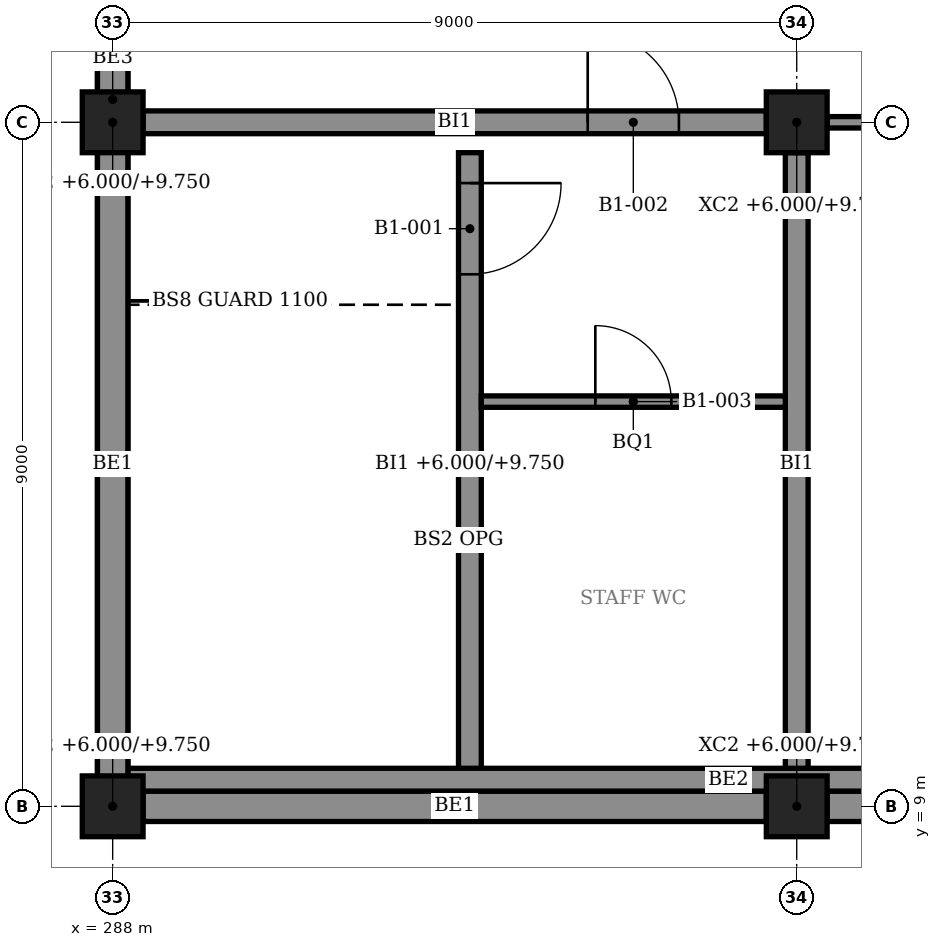
"""IFC4 building model, lengths in metres.
Left out: names, types, materials, properties, quantities, classifications, styles, units other than length and angle.
Written with IfcOpenShell. Run it as: python <this file> out.ifc"""

import sys

from ifc_helpers import new_model, si_unit, direction, frame, frame_2d, origin, origin_2d, place, context, subcontext, project, spatial, rectangle, extrude, element, fill, save


model = new_model("IFC4")
c1 = context("Model", 3, precision=1e-05, world=origin(), true_north=direction((0.0, 1.0)))
c2 = subcontext(c1, "Body", "Model", "MODEL_VIEW")
j1 = project(units=[si_unit("LENGTHUNIT", "METRE"), si_unit("PLANEANGLEUNIT", "RADIAN")], contexts=[c1])
p1 = place(None, origin())
s1 = spatial("IfcSite", under=j1, at=p1, CompositionType="ELEMENT")
p2 = place(p1, origin())
s2 = spatial("IfcBuilding", under=s1, at=p2, CompositionType="ELEMENT")
p3 = place(p2, frame((0.0, 0.0, 6.0)))
s3 = spatial("IfcBuildingStorey", under=s2, at=p3, CompositionType="ELEMENT", Elevation=6.0)
for number, where, z_axis, x_axis in (
    (1, (288.0, 9.0, 0.0), (0.0, 0.0, 1.0), (1.0, 0.0, 0.0)),
    (2, (297.0, 9.0, 0.0), (0.0, 0.0, 1.0), (1.0, 0.0, 0.0)),
    (3, (288.0, 18.0, 0.0), (0.0, 0.0, 1.0), (1.0, 0.0, 0.0)),
    (4, (297.0, 18.0, 0.0), (0.0, 0.0, 1.0), (1.0, 0.0, 0.0)),
):
    element("IfcColumn", number, at=place(p3, frame(where, z_axis=z_axis, x_axis=x_axis)), inside=s3, PredefinedType="COLUMN", context=c2, shape_type="SweptSolid", body=[
        extrude(rectangle(XDim=0.8, YDim=0.8, at=origin_2d()), origin(), (0.0, 0.0, 1.0), 3.75),
    ])
p4 = place(p3, frame((288.0, 9.4, 0.0), z_axis=(0.0, 0.0, 1.0), x_axis=(0.0, 1.0, 0.0)))
e5 = element("IfcWall", 5, at=p4, inside=s3, PredefinedType="STANDARD", context=c2, shape_type="SweptSolid", body=[
    extrude(rectangle(XDim=8.2, YDim=0.4, at=frame_2d((4.1, 0.0))), origin(), (0.0, 0.0, 1.0), 3.05),
])
p5 = place(p3, frame((288.0, 18.4, 0.0), z_axis=(0.0, 0.0, 1.0), x_axis=(0.0, 1.0, 0.0)))
e6 = element("IfcWall", 6, at=p5, inside=s3, PredefinedType="STANDARD", context=c2, shape_type="SweptSolid", body=[
    extrude(rectangle(XDim=8.2, YDim=0.4, at=frame_2d((4.1, 0.0))), origin(), (0.0, 0.0, 1.0), 3.05),
])
p6 = place(p5, frame((1.05, 0.0, 0.9)))
e7 = element("IfcOpeningElement", 7, at=p6, cuts=e6, PredefinedType="OPENING", context=c2, shape_type="SweptSolid", body=[
    extrude(rectangle(XDim=1.5, YDim=1.8, at=frame_2d((0.75, 0.9))), frame((0.0, 0.21, 0.0), z_axis=(0.0, -1.0, 0.0), x_axis=(1.0, 0.0, 0.0)), (0.0, 0.0, 1.0), 0.42),
])
p7 = place(p5, frame((3.55, 0.0, 0.9)))
e8 = element("IfcOpeningElement", 8, at=p7, cuts=e6, PredefinedType="OPENING", context=c2, shape_type="SweptSolid", body=[
    extrude(rectangle(XDim=1.5, YDim=1.8, at=frame_2d((0.75, 0.9))), frame((0.0, 0.21, 0.0), z_axis=(0.0, -1.0, 0.0), x_axis=(1.0, 0.0, 0.0)), (0.0, 0.0, 1.0), 0.42),
])
p8 = place(p5, frame((6.05, 0.0, 0.9)))
e9 = element("IfcOpeningElement", 9, at=p8, cuts=e6, PredefinedType="OPENING", context=c2, shape_type="SweptSolid", body=[
    extrude(rectangle(XDim=1.5, YDim=1.8, at=frame_2d((0.75, 0.9))), frame((0.0, 0.21, 0.0), z_axis=(0.0, -1.0, 0.0), x_axis=(1.0, 0.0, 0.0)), (0.0, 0.0, 1.0), 0.42),
])
for number, where, z_axis, x_axis in (
    (10, (288.4, 9.0, 0.0), (0.0, 0.0, 1.0), (1.0, 0.0, 0.0)),
    (11, (297.4, 9.0, 0.0), (0.0, 0.0, 1.0), (1.0, 0.0, 0.0)),
):
    element("IfcWall", number, at=place(p3, frame(where, z_axis=z_axis, x_axis=x_axis)), inside=s3, PredefinedType="STANDARD", context=c2, shape_type="SweptSolid", body=[
        extrude(rectangle(XDim=8.2, YDim=0.4, at=frame_2d((4.1, 0.0))), origin(), (0.0, 0.0, 1.0), 3.05),
    ])
p9 = place(p3, frame((288.0, 9.2, 4.0), z_axis=(0.0, 0.0, 1.0), x_axis=(0.0, 1.0, 0.0)))
e12 = element("IfcWall", 12, at=p9, inside=s3, PredefinedType="PARAPET", context=c2, shape_type="SweptSolid", body=[
    extrude(rectangle(XDim=18.2, YDim=0.4, at=frame_2d((9.1, 0.0))), origin(), (0.0, 0.0, 1.0), 1.121),
])
p10 = place(p3, frame((288.2, 9.35, 4.0), z_axis=(0.0, 0.0, 1.0), x_axis=(1.0, 0.0, 0.0)))
e13 = element("IfcWall", 13, at=p10, inside=s3, PredefinedType="PARAPET", context=c2, shape_type="SweptSolid", body=[
    extrude(rectangle(XDim=62.6, YDim=0.3, at=frame_2d((31.3, 0.0))), origin(), (0.0, 0.0, 1.0), 1.121),
])
p11 = place(p3, frame((292.7, 9.4, 0.0), z_axis=(0.0, 0.0, 1.0), x_axis=(0.0, 1.0, 0.0)))
e14 = element("IfcWall", 14, at=p11, inside=s3, PredefinedType="STANDARD", context=c2, shape_type="SweptSolid", body=[
    extrude(rectangle(XDim=8.2, YDim=0.3, at=frame_2d((4.1, 0.0))), origin(), (0.0, 0.0, 1.0), 3.75),
])
p12 = place(p11, frame((6.6, 0.0, 0.0)))
e15 = element("IfcOpeningElement", 15, at=p12, cuts=e14, PredefinedType="OPENING", context=c2, shape_type="SweptSolid", body=[
    extrude(rectangle(XDim=1.2, YDim=2.4, at=frame_2d((0.6, 1.2))), frame((0.0, 0.16, 0.0), z_axis=(0.0, -1.0, 0.0), x_axis=(1.0, 0.0, 0.0)), (0.0, 0.0, 1.0), 0.32),
])
p13 = place(p3, frame((297.0, 9.4, 0.0), z_axis=(0.0, 0.0, 1.0), x_axis=(0.0, 1.0, 0.0)))
e16 = element("IfcWall", 16, at=p13, inside=s3, PredefinedType="STANDARD", context=c2, shape_type="SweptSolid", body=[
    extrude(rectangle(XDim=8.2, YDim=0.3, at=frame_2d((4.1, 0.0))), origin(), (0.0, 0.0, 1.0), 3.05),
])
p14 = place(p3, frame((288.4, 18.0, 0.0), z_axis=(0.0, 0.0, 1.0), x_axis=(1.0, 0.0, 0.0)))
e17 = element("IfcWall", 17, at=p14, inside=s3, PredefinedType="STANDARD", context=c2, shape_type="SweptSolid", body=[
    extrude(rectangle(XDim=8.2, YDim=0.3, at=frame_2d((4.1, 0.0))), origin(), (0.0, 0.0, 1.0), 3.05),
])
p15 = place(p14, frame((5.85, 0.0, 0.0)))
e18 = element("IfcOpeningElement", 18, at=p15, cuts=e17, PredefinedType="OPENING", context=c2, shape_type="SweptSolid", body=[
    extrude(rectangle(XDim=1.2, YDim=2.4, at=frame_2d((0.6, 1.2))), frame((0.0, 0.16, 0.0), z_axis=(0.0, -1.0, 0.0), x_axis=(1.0, 0.0, 0.0)), (0.0, 0.0, 1.0), 0.32),
])
p16 = place(p3, frame((292.85, 14.325, 0.0), z_axis=(0.0, 0.0, 1.0), x_axis=(1.0, 0.0, 0.0)))
e19 = element("IfcWall", 19, at=p16, inside=s3, PredefinedType="PARTITIONING", context=c2, shape_type="SweptSolid", body=[
    extrude(rectangle(XDim=4.0, YDim=0.15, at=frame_2d((2.0, 0.0))), origin(), (0.0, 0.0, 1.0), 3.75),
])
p17 = place(p16, frame((1.5, 0.0, 0.0)))
e20 = element("IfcOpeningElement", 20, at=p17, cuts=e19, PredefinedType="OPENING", context=c2, shape_type="SweptSolid", body=[
    extrude(rectangle(XDim=1.0, YDim=2.4, at=frame_2d((0.5, 1.2))), frame((0.0, 0.085, 0.0), z_axis=(0.0, -1.0, 0.0), x_axis=(1.0, 0.0, 0.0)), (0.0, 0.0, 1.0), 0.17),
])
p18 = place(p3, frame((297.4, 18.0, 0.0), z_axis=(0.0, 0.0, 1.0), x_axis=(1.0, 0.0, 0.0)))
e21 = element("IfcWall", 21, at=p18, inside=s3, PredefinedType="PARTITIONING", context=c2, shape_type="SweptSolid", body=[
    extrude(rectangle(XDim=8.2, YDim=0.15, at=frame_2d((4.1, 0.0))), origin(), (0.0, 0.0, 1.0), 3.05),
])
p19 = place(p12, frame((1.2, 0.0, 0.0), z_axis=(0.0, 0.0, 1.0), x_axis=(-1.0, 0.0, 0.0)))
e22 = element("IfcDoor", 22, at=p19, inside=s3, OperationType="SINGLE_SWING_RIGHT", PredefinedType="DOOR", context=c2, shape_type="SweptSolid", body=[
    extrude(rectangle(XDim=1.2, YDim=2.4, at=frame_2d((0.6, 1.2))), frame((0.0, 0.025, 0.0), z_axis=(0.0, -1.0, 0.0), x_axis=(1.0, 0.0, 0.0)), (0.0, 0.0, 1.0), 0.05),
])
fill(e15, e22)
p20 = place(p15, origin())
e23 = element("IfcDoor", 23, at=p20, inside=s3, OperationType="SINGLE_SWING_LEFT", PredefinedType="DOOR", context=c2, shape_type="SweptSolid", body=[
    extrude(rectangle(XDim=1.2, YDim=2.4, at=frame_2d((0.6, 1.2))), frame((0.0, 0.025, 0.0), z_axis=(0.0, -1.0, 0.0), x_axis=(1.0, 0.0, 0.0)), (0.0, 0.0, 1.0), 0.05),
])
fill(e18, e23)
p21 = place(p17, origin())
e24 = element("IfcDoor", 24, at=p21, inside=s3, OperationType="SINGLE_SWING_LEFT", PredefinedType="DOOR", context=c2, shape_type="SweptSolid", body=[
    extrude(rectangle(XDim=1.0, YDim=2.4, at=frame_2d((0.5, 1.2))), frame((0.0, 0.025, 0.0), z_axis=(0.0, -1.0, 0.0), x_axis=(1.0, 0.0, 0.0)), (0.0, 0.0, 1.0), 0.05),
])
fill(e20, e24)
save(model, sys.argv[1])
